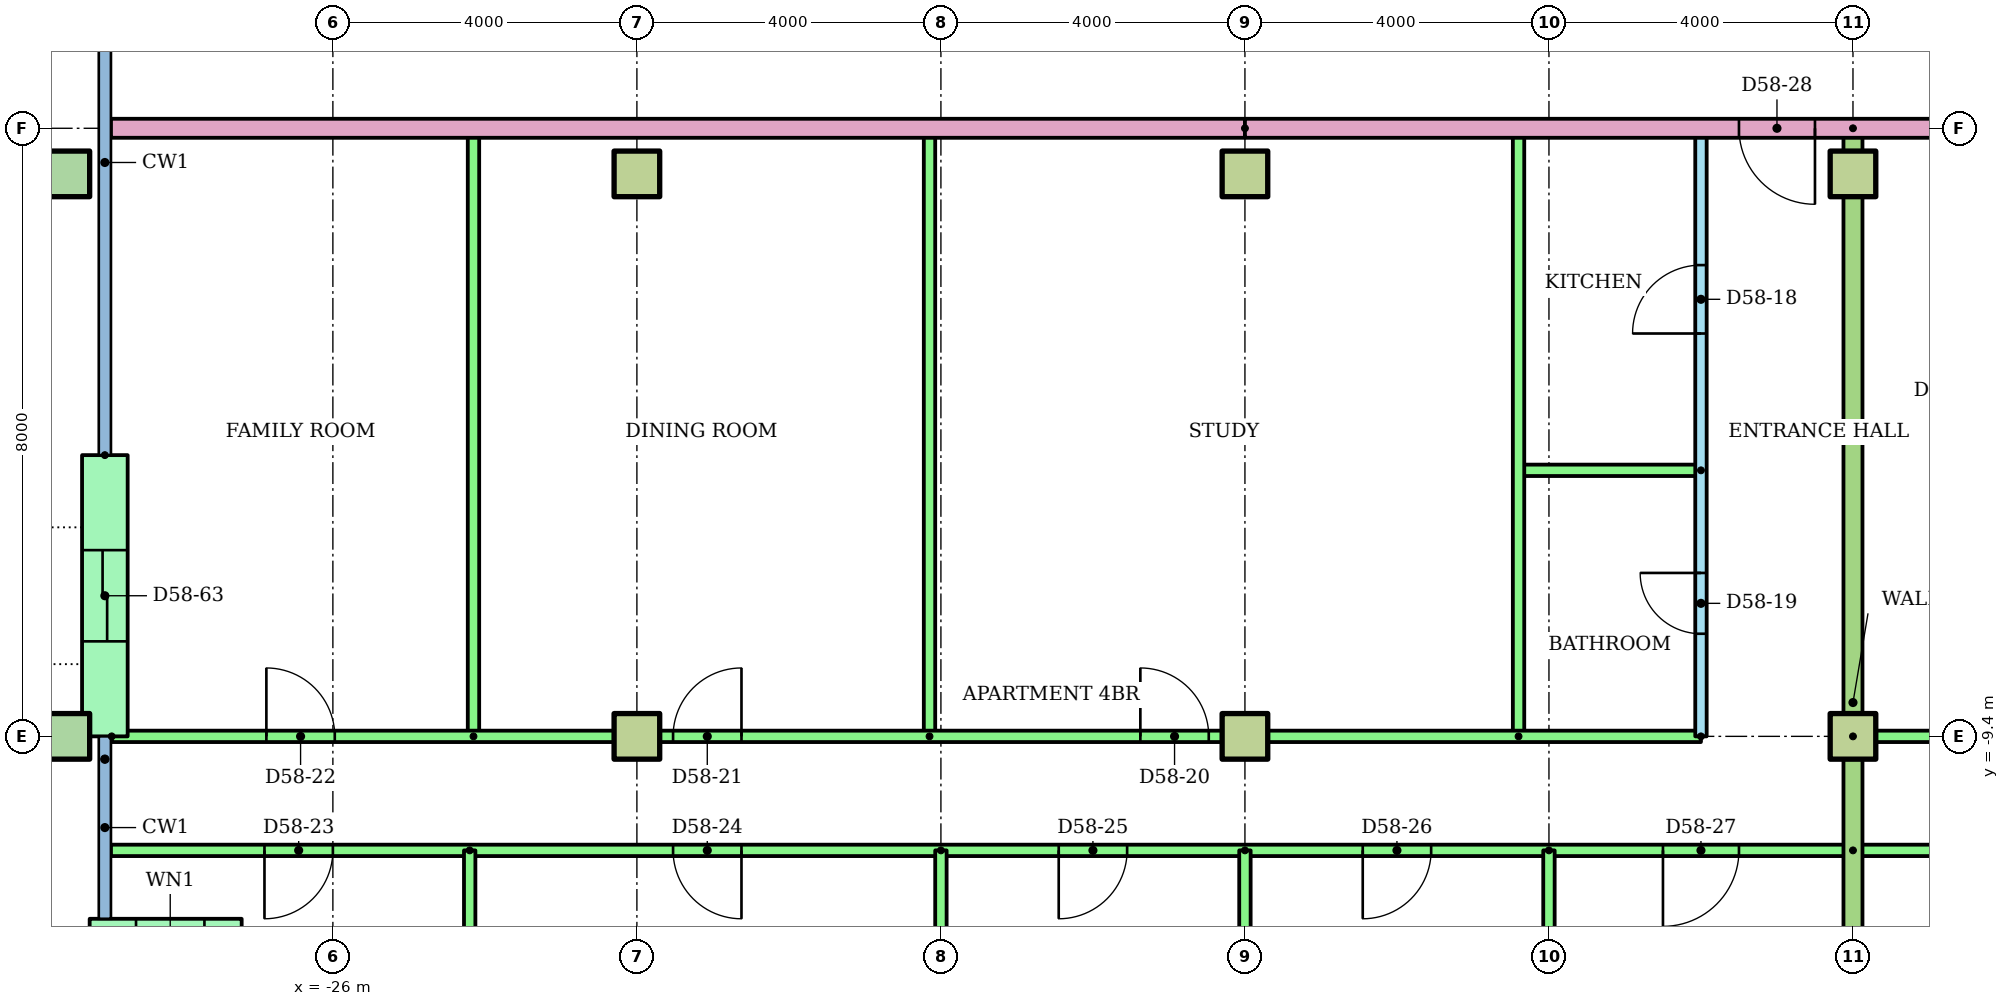
"""IFC4 building model, lengths in metres.
Left out: names, types, materials, properties, quantities, classifications, styles, units other than length and angle.
Written with IfcOpenShell. Run it as: python <this file> out.ifc"""

import sys

from ifc_helpers import new_model, si_unit, direction, frame, frame_2d, origin, origin_2d, place, context, subcontext, project, spatial, rectangle, hollow_rectangle, extrude, element, fill, save


model = new_model("IFC4")
c1 = context("Model", 3, precision=1e-05, world=origin(), true_north=direction((0.0, 1.0)))
c2 = subcontext(c1, "Body", "Model", "MODEL_VIEW")
j1 = project(units=[si_unit("LENGTHUNIT", "METRE"), si_unit("PLANEANGLEUNIT", "RADIAN")], contexts=[c1])
p1 = place(None, origin())
s1 = spatial("IfcSite", under=j1, at=p1, CompositionType="ELEMENT")
p2 = place(p1, origin())
s2 = spatial("IfcBuilding", under=s1, at=p2, CompositionType="ELEMENT")
p3 = place(p2, frame((0.0, 0.0, 223.6)))
s3 = spatial("IfcBuildingStorey", under=s2, at=p3, CompositionType="ELEMENT", Elevation=223.6)
p4 = place(p3, frame((-29.5, -9.4, 0.0)))
e1 = element("IfcColumn", 1, at=p4, inside=s3, PredefinedType="COLUMN", context=c2, shape_type="SweptSolid", body=[
    extrude(hollow_rectangle(XDim=0.6, YDim=0.6, WallThickness=0.03, at=origin_2d()), origin(), (0.0, 0.0, 1.0), 3.2),
])
for number, where in (
    (2, (-22.0, -9.4, 0.0)),
    (3, (-14.0, -9.4, 0.0)),
    (4, (-6.0, -9.4, 0.0)),
):
    element("IfcColumn", number, at=place(p3, frame(where)), inside=s3, PredefinedType="COLUMN", context=c2, shape_type="SweptSolid", body=[
        extrude(rectangle(XDim=0.6, YDim=0.6, at=origin_2d()), origin(), (0.0, 0.0, 1.0), 3.2),
    ])
p5 = place(p3, frame((-29.5, -2.0, 0.0)))
e5 = element("IfcColumn", 5, at=p5, inside=s3, PredefinedType="COLUMN", context=c2, shape_type="SweptSolid", body=[
    extrude(hollow_rectangle(XDim=0.6, YDim=0.6, WallThickness=0.03, at=origin_2d()), origin(), (0.0, 0.0, 1.0), 3.2),
])
for number, where in (
    (6, (-22.0, -2.0, 0.0)),
    (7, (-14.0, -2.0, 0.0)),
    (8, (-6.0, -2.0, 0.0)),
):
    element("IfcColumn", number, at=place(p3, frame(where)), inside=s3, PredefinedType="COLUMN", context=c2, shape_type="SweptSolid", body=[
        extrude(rectangle(XDim=0.6, YDim=0.6, at=origin_2d()), origin(), (0.0, 0.0, 1.0), 3.2),
    ])
p6 = place(p3, frame((-29.0, -5.7, 0.0), z_axis=(0.0, 0.0, 1.0), x_axis=(0.0, -1.0, 0.0)))
e9 = element("IfcWall", 9, at=p6, inside=s3, PredefinedType="STANDARD", context=c2, shape_type="SweptSolid", body=[
    extrude(rectangle(XDim=3.7, YDim=0.6, at=frame_2d((1.85, 0.0))), origin(), (0.0, 0.0, 1.0), 2.92),
])
p7 = place(p6, frame((1.25, 0.0, 0.0)))
e10 = element("IfcOpeningElement", 10, at=p7, cuts=e9, PredefinedType="OPENING", context=c2, shape_type="SweptSolid", body=[
    extrude(rectangle(XDim=1.2, YDim=2.1, at=frame_2d((0.6, 1.05))), frame((0.0, 0.31, 0.0), z_axis=(0.0, -1.0, 0.0), x_axis=(1.0, 0.0, 0.0)), (0.0, 0.0, 1.0), 0.62),
])
p8 = place(p3, frame((-29.2, -12.1, 0.0)))
e11 = element("IfcWall", 11, at=p8, inside=s3, PredefinedType="STANDARD", context=c2, shape_type="SweptSolid", body=[
    extrude(rectangle(XDim=2.0, YDim=0.6, at=frame_2d((1.0, 0.0))), origin(), (0.0, 0.0, 1.0), 2.92),
])
p9 = place(p8, frame((0.61, 0.0, 0.9)))
e12 = element("IfcOpeningElement", 12, at=p9, cuts=e11, PredefinedType="OPENING", context=c2, shape_type="SweptSolid", body=[
    extrude(rectangle(XDim=0.9, YDim=1.5, at=frame_2d((0.45, 0.75))), frame((0.0, 0.31, 0.0), z_axis=(0.0, -1.0, 0.0), x_axis=(1.0, 0.0, 0.0)), (0.0, 0.0, 1.0), 0.62),
])
p10 = place(p3, frame((-8.0, -9.4, 0.0), z_axis=(0.0, 0.0, 1.0), x_axis=(0.0, 1.0, 0.0)))
e13 = element("IfcWall", 13, at=p10, inside=s3, PredefinedType="PARTITIONING", context=c2, shape_type="SweptSolid", body=[
    extrude(rectangle(XDim=8.0, YDim=0.15, at=frame_2d((4.0, 0.0))), origin(), (0.0, 0.0, 1.0), 2.4),
])
p11 = place(p10, frame((5.3, 0.0, 0.0)))
e14 = element("IfcOpeningElement", 14, at=p11, cuts=e13, PredefinedType="OPENING", context=c2, shape_type="SweptSolid", body=[
    extrude(rectangle(XDim=0.9, YDim=2.1, at=frame_2d((0.45, 1.05))), frame((0.0, 0.085, 0.0), z_axis=(0.0, -1.0, 0.0), x_axis=(1.0, 0.0, 0.0)), (0.0, 0.0, 1.0), 0.17),
])
p12 = place(p10, frame((1.35, 0.0, 0.0)))
e15 = element("IfcOpeningElement", 15, at=p12, cuts=e13, PredefinedType="OPENING", context=c2, shape_type="SweptSolid", body=[
    extrude(rectangle(XDim=0.8, YDim=2.1, at=frame_2d((0.4, 1.05))), frame((0.0, 0.085, 0.0), z_axis=(0.0, -1.0, 0.0), x_axis=(1.0, 0.0, 0.0)), (0.0, 0.0, 1.0), 0.17),
])
p13 = place(p3, frame((-8.0, -5.9, 0.0), z_axis=(0.0, 0.0, 1.0), x_axis=(-1.0, 0.0, 0.0)))
e16 = element("IfcWall", 16, at=p13, inside=s3, PredefinedType="PARTITIONING", context=c2, shape_type="SweptSolid", body=[
    extrude(rectangle(XDim=2.4, YDim=0.15, at=frame_2d((1.2, 0.0))), origin(), (0.0, 0.0, 1.0), 2.4),
])
for number, where, z_axis, x_axis in (
    (17, (-10.4, -9.4, 0.0), (0.0, 0.0, 1.0), (0.0, 1.0, 0.0)),
    (18, (-18.15, -9.4, 0.0), (0.0, 0.0, 1.0), (0.0, 1.0, 0.0)),
    (19, (-24.15, -9.4, 0.0), (0.0, 0.0, 1.0), (0.0, 1.0, 0.0)),
):
    element("IfcWall", number, at=place(p3, frame(where, z_axis=z_axis, x_axis=x_axis)), inside=s3, PredefinedType="PARTITIONING", context=c2, shape_type="SweptSolid", body=[
        extrude(rectangle(XDim=8.0, YDim=0.15, at=frame_2d((4.0, 0.0))), origin(), (0.0, 0.0, 1.0), 2.4),
    ])
p14 = place(p3, frame((-28.91, -9.4, 0.0)))
e20 = element("IfcWall", 20, at=p14, inside=s3, PredefinedType="PARTITIONING", context=c2, shape_type="SweptSolid", body=[
    extrude(rectangle(XDim=20.91, YDim=0.15, at=frame_2d((10.455, 0.0))), origin(), (0.0, 0.0, 1.0), 2.4),
])
p15 = place(p14, frame((13.534, 0.0, 0.0)))
e21 = element("IfcOpeningElement", 21, at=p15, cuts=e20, PredefinedType="OPENING", context=c2, shape_type="SweptSolid", body=[
    extrude(rectangle(XDim=0.9, YDim=2.1, at=frame_2d((0.45, 1.05))), frame((0.0, 0.085, 0.0), z_axis=(0.0, -1.0, 0.0), x_axis=(1.0, 0.0, 0.0)), (0.0, 0.0, 1.0), 0.17),
])
p16 = place(p14, frame((7.386, 0.0, 0.0)))
e22 = element("IfcOpeningElement", 22, at=p16, cuts=e20, PredefinedType="OPENING", context=c2, shape_type="SweptSolid", body=[
    extrude(rectangle(XDim=0.9, YDim=2.1, at=frame_2d((0.45, 1.05))), frame((0.0, 0.085, 0.0), z_axis=(0.0, -1.0, 0.0), x_axis=(1.0, 0.0, 0.0)), (0.0, 0.0, 1.0), 0.17),
])
p17 = place(p14, frame((2.035, 0.0, 0.0)))
e23 = element("IfcOpeningElement", 23, at=p17, cuts=e20, PredefinedType="OPENING", context=c2, shape_type="SweptSolid", body=[
    extrude(rectangle(XDim=0.9, YDim=2.1, at=frame_2d((0.45, 1.05))), frame((0.0, 0.085, 0.0), z_axis=(0.0, -1.0, 0.0), x_axis=(1.0, 0.0, 0.0)), (0.0, 0.0, 1.0), 0.17),
])
p18 = place(p3, frame((-6.0, -10.9, 0.0), z_axis=(0.0, 0.0, 1.0), x_axis=(-1.0, 0.0, 0.0)))
e24 = element("IfcWall", 24, at=p18, inside=s3, PredefinedType="PARTITIONING", context=c2, shape_type="SweptSolid", body=[
    extrude(rectangle(XDim=22.92, YDim=0.15, at=frame_2d((11.46, 0.0))), origin(), (0.0, 0.0, 1.0), 2.4),
])
p19 = place(p18, frame((20.0, 0.0, 0.0)))
e25 = element("IfcOpeningElement", 25, at=p19, cuts=e24, PredefinedType="OPENING", context=c2, shape_type="SweptSolid", body=[
    extrude(rectangle(XDim=0.9, YDim=2.1, at=frame_2d((0.45, 1.05))), frame((0.0, 0.085, 0.0), z_axis=(0.0, -1.0, 0.0), x_axis=(1.0, 0.0, 0.0)), (0.0, 0.0, 1.0), 0.17),
])
p20 = place(p18, frame((14.624, 0.0, 0.0)))
e26 = element("IfcOpeningElement", 26, at=p20, cuts=e24, PredefinedType="OPENING", context=c2, shape_type="SweptSolid", body=[
    extrude(rectangle(XDim=0.9, YDim=2.1, at=frame_2d((0.45, 1.05))), frame((0.0, 0.085, 0.0), z_axis=(0.0, -1.0, 0.0), x_axis=(1.0, 0.0, 0.0)), (0.0, 0.0, 1.0), 0.17),
])
p21 = place(p18, frame((9.55, 0.0, 0.0)))
e27 = element("IfcOpeningElement", 27, at=p21, cuts=e24, PredefinedType="OPENING", context=c2, shape_type="SweptSolid", body=[
    extrude(rectangle(XDim=0.9, YDim=2.1, at=frame_2d((0.45, 1.05))), frame((0.0, 0.085, 0.0), z_axis=(0.0, -1.0, 0.0), x_axis=(1.0, 0.0, 0.0)), (0.0, 0.0, 1.0), 0.17),
])
p22 = place(p18, frame((5.55, 0.0, 0.0)))
e28 = element("IfcOpeningElement", 28, at=p22, cuts=e24, PredefinedType="OPENING", context=c2, shape_type="SweptSolid", body=[
    extrude(rectangle(XDim=0.9, YDim=2.1, at=frame_2d((0.45, 1.05))), frame((0.0, 0.085, 0.0), z_axis=(0.0, -1.0, 0.0), x_axis=(1.0, 0.0, 0.0)), (0.0, 0.0, 1.0), 0.17),
])
p23 = place(p18, frame((1.5, 0.0, 0.0)))
e29 = element("IfcOpeningElement", 29, at=p23, cuts=e24, PredefinedType="OPENING", context=c2, shape_type="SweptSolid", body=[
    extrude(rectangle(XDim=1.0, YDim=2.1, at=frame_2d((0.5, 1.05))), frame((0.0, 0.085, 0.0), z_axis=(0.0, -1.0, 0.0), x_axis=(1.0, 0.0, 0.0)), (0.0, 0.0, 1.0), 0.17),
])
p24 = place(p3, frame((-24.2, -10.9, 0.0), z_axis=(0.0, 0.0, 1.0), x_axis=(0.0, -1.0, 0.0)))
e30 = element("IfcWall", 30, at=p24, inside=s3, PredefinedType="PARTITIONING", context=c2, shape_type="SweptSolid", body=[
    extrude(rectangle(XDim=3.82, YDim=0.15, at=frame_2d((1.91, 0.0))), origin(), (0.0, 0.0, 1.0), 2.4),
])
p25 = place(p3, frame((-18.0, -10.9, 0.0), z_axis=(0.0, 0.0, 1.0), x_axis=(0.0, -1.0, 0.0)))
e31 = element("IfcWall", 31, at=p25, inside=s3, PredefinedType="PARTITIONING", context=c2, shape_type="SweptSolid", body=[
    extrude(rectangle(XDim=5.621, YDim=0.15, at=frame_2d((2.811, 0.0))), origin(), (0.0, 0.0, 1.0), 2.4),
])
p26 = place(p3, frame((-14.0, -10.9, 0.0), z_axis=(0.0, 0.0, 1.0), x_axis=(0.0, -1.0, 0.0)))
e32 = element("IfcWall", 32, at=p26, inside=s3, PredefinedType="PARTITIONING", context=c2, shape_type="SweptSolid", body=[
    extrude(rectangle(XDim=5.61, YDim=0.15, at=frame_2d((2.805, 0.0))), origin(), (0.0, 0.0, 1.0), 2.4),
])
p27 = place(p3, frame((-10.0, -10.9, 0.0), z_axis=(0.0, 0.0, 1.0), x_axis=(0.0, -1.0, 0.0)))
e33 = element("IfcWall", 33, at=p27, inside=s3, PredefinedType="PARTITIONING", context=c2, shape_type="SweptSolid", body=[
    extrude(rectangle(XDim=5.621, YDim=0.15, at=frame_2d((2.811, 0.0))), origin(), (0.0, 0.0, 1.0), 2.4),
])
p28 = place(p3, frame((-6.0, -9.4, 0.0)))
e34 = element("IfcWall", 34, at=p28, inside=s3, PredefinedType="PARTITIONING", context=c2, shape_type="SweptSolid", body=[
    extrude(rectangle(XDim=6.0, YDim=0.15, at=frame_2d((3.0, 0.0))), origin(), (0.0, 0.0, 1.0), 2.4),
])
p29 = place(p28, frame((1.35, 0.0, 0.0)))
e35 = element("IfcOpeningElement", 35, at=p29, cuts=e34, PredefinedType="OPENING", context=c2, shape_type="SweptSolid", body=[
    extrude(rectangle(XDim=0.9, YDim=2.1, at=frame_2d((0.45, 1.05))), frame((0.0, 0.085, 0.0), z_axis=(0.0, -1.0, 0.0), x_axis=(1.0, 0.0, 0.0)), (0.0, 0.0, 1.0), 0.17),
])
p30 = place(p3, frame((2.0, -10.9, 0.0), z_axis=(0.0, 0.0, 1.0), x_axis=(-1.0, 0.0, 0.0)))
e36 = element("IfcWall", 36, at=p30, inside=s3, PredefinedType="PARTITIONING", context=c2, shape_type="SweptSolid", body=[
    extrude(rectangle(XDim=8.0, YDim=0.15, at=frame_2d((4.0, 0.0))), origin(), (0.0, 0.0, 1.0), 2.4),
])
p31 = place(p30, frame((5.55, 0.0, 0.0)))
e37 = element("IfcOpeningElement", 37, at=p31, cuts=e36, PredefinedType="OPENING", context=c2, shape_type="SweptSolid", body=[
    extrude(rectangle(XDim=0.9, YDim=2.1, at=frame_2d((0.45, 1.05))), frame((0.0, 0.085, 0.0), z_axis=(0.0, -1.0, 0.0), x_axis=(1.0, 0.0, 0.0)), (0.0, 0.0, 1.0), 0.17),
])
p32 = place(p30, frame((1.5, 0.0, 0.0)))
e38 = element("IfcOpeningElement", 38, at=p32, cuts=e36, PredefinedType="OPENING", context=c2, shape_type="SweptSolid", body=[
    extrude(rectangle(XDim=1.0, YDim=2.1, at=frame_2d((0.5, 1.05))), frame((0.0, 0.085, 0.0), z_axis=(0.0, -1.0, 0.0), x_axis=(1.0, 0.0, 0.0)), (0.0, 0.0, 1.0), 0.17),
])
p33 = place(p3, frame((-6.0, -1.4, 0.0), z_axis=(0.0, 0.0, 1.0), x_axis=(0.0, -1.0, 0.0)))
e39 = element("IfcWall", 39, at=p33, inside=s3, PredefinedType="PARTITIONING", context=c2, shape_type="SweptSolid", body=[
    extrude(rectangle(XDim=15.11, YDim=0.25, at=frame_2d((7.555, 0.0))), origin(), (0.0, 0.0, 1.0), 2.4),
])
p34 = place(p3, frame((-14.0, -1.4, 0.0), z_axis=(0.0, 0.0, 1.0), x_axis=(-1.0, 0.0, 0.0)))
e40 = element("IfcWall", 40, at=p34, inside=s3, PredefinedType="PARTITIONING", context=c2, shape_type="SweptSolid", body=[
    extrude(rectangle(XDim=14.92, YDim=0.25, at=frame_2d((7.46, 0.0))), origin(), (0.0, 0.0, 1.0), 2.4),
])
p35 = place(p3, frame((14.0, -1.4, 0.0), z_axis=(0.0, 0.0, 1.0), x_axis=(-1.0, 0.0, 0.0)))
e41 = element("IfcWall", 41, at=p35, inside=s3, PredefinedType="PARTITIONING", context=c2, shape_type="SweptSolid", body=[
    extrude(rectangle(XDim=28.0, YDim=0.25, at=frame_2d((14.0, 0.0))), origin(), (0.0, 0.0, 1.0), 2.4),
])
p36 = place(p35, frame((20.5, 0.0, 0.0)))
e42 = element("IfcOpeningElement", 42, at=p36, cuts=e41, PredefinedType="OPENING", context=c2, shape_type="SweptSolid", body=[
    extrude(rectangle(XDim=1.0, YDim=2.1, at=frame_2d((0.5, 1.05))), frame((0.0, 0.135, 0.0), z_axis=(0.0, -1.0, 0.0), x_axis=(1.0, 0.0, 0.0)), (0.0, 0.0, 1.0), 0.27),
])
p37 = place(p35, frame((12.5, 0.0, 0.0)))
e43 = element("IfcOpeningElement", 43, at=p37, cuts=e41, PredefinedType="OPENING", context=c2, shape_type="SweptSolid", body=[
    extrude(rectangle(XDim=1.0, YDim=2.1, at=frame_2d((0.5, 1.05))), frame((0.0, 0.135, 0.0), z_axis=(0.0, -1.0, 0.0), x_axis=(1.0, 0.0, 0.0)), (0.0, 0.0, 1.0), 0.27),
])
p38 = place(p35, frame((10.5, 0.0, 0.0)))
e44 = element("IfcOpeningElement", 44, at=p38, cuts=e41, PredefinedType="OPENING", context=c2, shape_type="SweptSolid", body=[
    extrude(rectangle(XDim=1.0, YDim=2.1, at=frame_2d((0.5, 1.05))), frame((0.0, 0.135, 0.0), z_axis=(0.0, -1.0, 0.0), x_axis=(1.0, 0.0, 0.0)), (0.0, 0.0, 1.0), 0.27),
])
p39 = place(p11, origin())
e45 = element("IfcDoor", 45, at=p39, inside=s3, OperationType="SINGLE_SWING_LEFT", PredefinedType="DOOR", context=c2, shape_type="SweptSolid", body=[
    extrude(rectangle(XDim=0.9, YDim=2.1, at=frame_2d((0.45, 1.05))), frame((0.0, 0.025, 0.0), z_axis=(0.0, -1.0, 0.0), x_axis=(1.0, 0.0, 0.0)), (0.0, 0.0, 1.0), 0.05),
])
fill(e14, e45)
p40 = place(p12, origin())
e46 = element("IfcDoor", 46, at=p40, inside=s3, OperationType="SINGLE_SWING_RIGHT", PredefinedType="DOOR", context=c2, shape_type="SweptSolid", body=[
    extrude(rectangle(XDim=0.8, YDim=2.1, at=frame_2d((0.4, 1.05))), frame((0.0, 0.025, 0.0), z_axis=(0.0, -1.0, 0.0), x_axis=(1.0, 0.0, 0.0)), (0.0, 0.0, 1.0), 0.05),
])
fill(e15, e46)
p41 = place(p15, origin())
e47 = element("IfcDoor", 47, at=p41, inside=s3, OperationType="SINGLE_SWING_LEFT", PredefinedType="DOOR", context=c2, shape_type="SweptSolid", body=[
    extrude(rectangle(XDim=0.9, YDim=2.1, at=frame_2d((0.45, 1.05))), frame((0.0, 0.025, 0.0), z_axis=(0.0, -1.0, 0.0), x_axis=(1.0, 0.0, 0.0)), (0.0, 0.0, 1.0), 0.05),
])
fill(e21, e47)
p42 = place(p16, origin())
e48 = element("IfcDoor", 48, at=p42, inside=s3, OperationType="SINGLE_SWING_RIGHT", PredefinedType="DOOR", context=c2, shape_type="SweptSolid", body=[
    extrude(rectangle(XDim=0.9, YDim=2.1, at=frame_2d((0.45, 1.05))), frame((0.0, 0.025, 0.0), z_axis=(0.0, -1.0, 0.0), x_axis=(1.0, 0.0, 0.0)), (0.0, 0.0, 1.0), 0.05),
])
fill(e22, e48)
p43 = place(p17, origin())
e49 = element("IfcDoor", 49, at=p43, inside=s3, OperationType="SINGLE_SWING_LEFT", PredefinedType="DOOR", context=c2, shape_type="SweptSolid", body=[
    extrude(rectangle(XDim=0.9, YDim=2.1, at=frame_2d((0.45, 1.05))), frame((0.0, 0.025, 0.0), z_axis=(0.0, -1.0, 0.0), x_axis=(1.0, 0.0, 0.0)), (0.0, 0.0, 1.0), 0.05),
])
fill(e23, e49)
p44 = place(p19, origin())
e50 = element("IfcDoor", 50, at=p44, inside=s3, OperationType="SINGLE_SWING_RIGHT", PredefinedType="DOOR", context=c2, shape_type="SweptSolid", body=[
    extrude(rectangle(XDim=0.9, YDim=2.1, at=frame_2d((0.45, 1.05))), frame((0.0, 0.025, 0.0), z_axis=(0.0, -1.0, 0.0), x_axis=(1.0, 0.0, 0.0)), (0.0, 0.0, 1.0), 0.05),
])
fill(e25, e50)
p45 = place(p20, origin())
e51 = element("IfcDoor", 51, at=p45, inside=s3, OperationType="SINGLE_SWING_LEFT", PredefinedType="DOOR", context=c2, shape_type="SweptSolid", body=[
    extrude(rectangle(XDim=0.9, YDim=2.1, at=frame_2d((0.45, 1.05))), frame((0.0, 0.025, 0.0), z_axis=(0.0, -1.0, 0.0), x_axis=(1.0, 0.0, 0.0)), (0.0, 0.0, 1.0), 0.05),
])
fill(e26, e51)
p46 = place(p21, origin())
e52 = element("IfcDoor", 52, at=p46, inside=s3, OperationType="SINGLE_SWING_RIGHT", PredefinedType="DOOR", context=c2, shape_type="SweptSolid", body=[
    extrude(rectangle(XDim=0.9, YDim=2.1, at=frame_2d((0.45, 1.05))), frame((0.0, 0.025, 0.0), z_axis=(0.0, -1.0, 0.0), x_axis=(1.0, 0.0, 0.0)), (0.0, 0.0, 1.0), 0.05),
])
fill(e27, e52)
p47 = place(p22, origin())
e53 = element("IfcDoor", 53, at=p47, inside=s3, OperationType="SINGLE_SWING_RIGHT", PredefinedType="DOOR", context=c2, shape_type="SweptSolid", body=[
    extrude(rectangle(XDim=0.9, YDim=2.1, at=frame_2d((0.45, 1.05))), frame((0.0, 0.025, 0.0), z_axis=(0.0, -1.0, 0.0), x_axis=(1.0, 0.0, 0.0)), (0.0, 0.0, 1.0), 0.05),
])
fill(e28, e53)
p48 = place(p23, origin())
e54 = element("IfcDoor", 54, at=p48, inside=s3, OperationType="SINGLE_SWING_RIGHT", PredefinedType="DOOR", context=c2, shape_type="SweptSolid", body=[
    extrude(rectangle(XDim=1.0, YDim=2.1, at=frame_2d((0.5, 1.05))), frame((0.0, 0.025, 0.0), z_axis=(0.0, -1.0, 0.0), x_axis=(1.0, 0.0, 0.0)), (0.0, 0.0, 1.0), 0.05),
])
fill(e29, e54)
p49 = place(p36, origin())
e55 = element("IfcDoor", 55, at=p49, inside=s3, OperationType="SINGLE_SWING_LEFT", PredefinedType="DOOR", context=c2, shape_type="SweptSolid", body=[
    extrude(rectangle(XDim=1.0, YDim=2.1, at=frame_2d((0.5, 1.05))), frame((0.0, 0.025, 0.0), z_axis=(0.0, -1.0, 0.0), x_axis=(1.0, 0.0, 0.0)), (0.0, 0.0, 1.0), 0.05),
])
fill(e42, e55)
p50 = place(p7, origin())
e56 = element("IfcDoor", 56, at=p50, inside=s3, OperationType="SLIDING_TO_LEFT", PredefinedType="DOOR", context=c2, shape_type="SweptSolid", body=[
    extrude(rectangle(XDim=1.2, YDim=2.1, at=frame_2d((0.6, 1.05))), frame((0.0, 0.025, 0.0), z_axis=(0.0, -1.0, 0.0), x_axis=(1.0, 0.0, 0.0)), (0.0, 0.0, 1.0), 0.05),
])
fill(e10, e56)
save(model, sys.argv[1])
